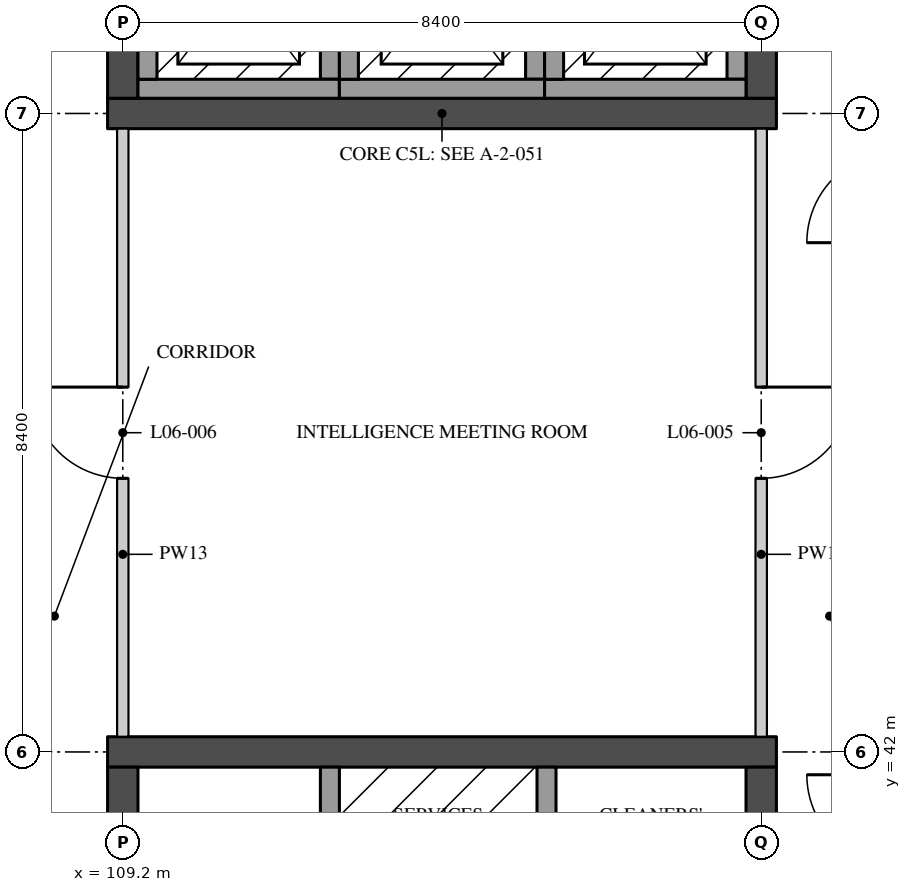
"""IFC4 building model, lengths in metres.
Left out: names, types, materials, properties, quantities, classifications, styles, units other than length and angle.
Written with IfcOpenShell. Run it as: python <this file> out.ifc"""

import sys

from ifc_helpers import new_model, si_unit, direction, frame, frame_2d, origin, place, context, subcontext, project, spatial, rectangle, extrude, element, fill, save


model = new_model("IFC4")
c1 = context("Model", 3, precision=1e-05, world=origin(), true_north=direction((0.0, 1.0)))
c2 = subcontext(c1, "Body", "Model", "MODEL_VIEW")
j1 = project(units=[si_unit("LENGTHUNIT", "METRE"), si_unit("PLANEANGLEUNIT", "RADIAN")], contexts=[c1])
p1 = place(None, origin())
s1 = spatial("IfcSite", under=j1, at=p1, CompositionType="ELEMENT")
p2 = place(p1, origin())
s2 = spatial("IfcBuilding", under=s1, at=p2, CompositionType="ELEMENT")
p3 = place(p2, frame((0.0, 0.0, 27.9)))
s3 = spatial("IfcBuildingStorey", under=s2, at=p3, CompositionType="ELEMENT", Elevation=27.9)
p4 = place(p3, frame((109.0, 50.4, 0.0), z_axis=(0.0, 0.0, 1.0), x_axis=(1.0, 0.0, 0.0)))
e1 = element("IfcWall", 1, at=p4, inside=s3, PredefinedType="SHEAR", context=c2, shape_type="SweptSolid", body=[
    extrude(rectangle(XDim=8.8, YDim=0.4, at=frame_2d((4.4, 0.0))), origin(), (0.0, 0.0, 1.0), 4.37),
])
p5 = place(p3, frame((109.2, 50.6, 0.0), z_axis=(0.0, 0.0, 1.0), x_axis=(0.0, 1.0, 0.0)))
e2 = element("IfcWall", 2, at=p5, inside=s3, PredefinedType="SHEAR", context=c2, shape_type="SweptSolid", body=[
    extrude(rectangle(XDim=8.0, YDim=0.4, at=frame_2d((4.0, 0.0))), origin(), (0.0, 0.0, 1.0), 4.37),
])
p6 = place(p5, frame((3.25, 0.0, 0.0)))
e3 = element("IfcOpeningElement", 3, at=p6, cuts=e2, PredefinedType="OPENING", context=c2, shape_type="SweptSolid", body=[
    extrude(rectangle(XDim=1.2, YDim=2.1, at=frame_2d((0.6, 1.05))), frame((0.0, 0.21, 0.0), z_axis=(0.0, -1.0, 0.0), x_axis=(1.0, 0.0, 0.0)), (0.0, 0.0, 1.0), 0.42),
])
p7 = place(p3, frame((117.6, 50.6, 0.0), z_axis=(0.0, 0.0, 1.0), x_axis=(0.0, 1.0, 0.0)))
e4 = element("IfcWall", 4, at=p7, inside=s3, PredefinedType="SHEAR", context=c2, shape_type="SweptSolid", body=[
    extrude(rectangle(XDim=8.0, YDim=0.4, at=frame_2d((4.0, 0.0))), origin(), (0.0, 0.0, 1.0), 4.37),
])
p8 = place(p7, frame((3.25, 0.0, 0.0)))
e5 = element("IfcOpeningElement", 5, at=p8, cuts=e4, PredefinedType="OPENING", context=c2, shape_type="SweptSolid", body=[
    extrude(rectangle(XDim=1.2, YDim=2.1, at=frame_2d((0.6, 1.05))), frame((0.0, 0.21, 0.0), z_axis=(0.0, -1.0, 0.0), x_axis=(1.0, 0.0, 0.0)), (0.0, 0.0, 1.0), 0.42),
])
p9 = place(p7, frame((6.0, 0.0, 0.0)))
e6 = element("IfcOpeningElement", 6, at=p9, cuts=e4, PredefinedType="OPENING", context=c2, shape_type="SweptSolid", body=[
    extrude(rectangle(XDim=1.2, YDim=2.1, at=frame_2d((0.6, 1.05))), frame((0.0, 0.21, 0.0), z_axis=(0.0, -1.0, 0.0), x_axis=(1.0, 0.0, 0.0)), (0.0, 0.0, 1.0), 0.42),
])
p10 = place(p3, frame((109.0, 42.0, 0.0), z_axis=(0.0, 0.0, 1.0), x_axis=(1.0, 0.0, 0.0)))
e7 = element("IfcWall", 7, at=p10, inside=s3, PredefinedType="SHEAR", context=c2, shape_type="SweptSolid", body=[
    extrude(rectangle(XDim=8.8, YDim=0.4, at=frame_2d((4.4, 0.0))), origin(), (0.0, 0.0, 1.0), 4.37),
])
p11 = place(p3, frame((109.2, 33.8, 0.0), z_axis=(0.0, 0.0, 1.0), x_axis=(0.0, 1.0, 0.0)))
e8 = element("IfcWall", 8, at=p11, inside=s3, PredefinedType="SHEAR", context=c2, shape_type="SweptSolid", body=[
    extrude(rectangle(XDim=8.0, YDim=0.4, at=frame_2d((4.0, 0.0))), origin(), (0.0, 0.0, 1.0), 4.37),
])
p12 = place(p11, frame((3.875, 0.0, 0.0)))
e9 = element("IfcOpeningElement", 9, at=p12, cuts=e8, PredefinedType="OPENING", context=c2, shape_type="SweptSolid", body=[
    extrude(rectangle(XDim=1.2, YDim=2.1, at=frame_2d((0.6, 1.05))), frame((0.0, 0.21, 0.0), z_axis=(0.0, -1.0, 0.0), x_axis=(1.0, 0.0, 0.0)), (0.0, 0.0, 1.0), 0.42),
])
p13 = place(p3, frame((117.6, 33.8, 0.0), z_axis=(0.0, 0.0, 1.0), x_axis=(0.0, 1.0, 0.0)))
e10 = element("IfcWall", 10, at=p13, inside=s3, PredefinedType="SHEAR", context=c2, shape_type="SweptSolid", body=[
    extrude(rectangle(XDim=8.0, YDim=0.4, at=frame_2d((4.0, 0.0))), origin(), (0.0, 0.0, 1.0), 4.37),
])
p14 = place(p13, frame((3.875, 0.0, 0.0)))
e11 = element("IfcOpeningElement", 11, at=p14, cuts=e10, PredefinedType="OPENING", context=c2, shape_type="SweptSolid", body=[
    extrude(rectangle(XDim=1.2, YDim=2.1, at=frame_2d((0.6, 1.05))), frame((0.0, 0.21, 0.0), z_axis=(0.0, -1.0, 0.0), x_axis=(1.0, 0.0, 0.0)), (0.0, 0.0, 1.0), 0.42),
])
p15 = place(p3, frame((111.925, 39.0, 0.0), z_axis=(0.0, 0.0, 1.0), x_axis=(0.0, 1.0, 0.0)))
e12 = element("IfcWall", 12, at=p15, inside=s3, PredefinedType="SOLIDWALL", context=c2, shape_type="SweptSolid", body=[
    extrude(rectangle(XDim=2.8, YDim=0.25, at=frame_2d((1.4, 0.0))), origin(), (0.0, 0.0, 1.0), 4.37),
])
p16 = place(p3, frame((114.775, 39.25, 0.0), z_axis=(0.0, 0.0, 1.0), x_axis=(0.0, 1.0, 0.0)))
e13 = element("IfcWall", 13, at=p16, inside=s3, PredefinedType="SOLIDWALL", context=c2, shape_type="SweptSolid", body=[
    extrude(rectangle(XDim=2.55, YDim=0.25, at=frame_2d((1.275, 0.0))), origin(), (0.0, 0.0, 1.0), 4.37),
])
p17 = place(p3, frame((111.925, 50.85, 0.0), z_axis=(0.0, 0.0, 1.0), x_axis=(0.0, 1.0, 0.0)))
e14 = element("IfcWall", 14, at=p17, inside=s3, PredefinedType="SOLIDWALL", context=c2, shape_type="SweptSolid", body=[
    extrude(rectangle(XDim=2.3, YDim=0.25, at=frame_2d((1.15, 0.0))), origin(), (0.0, 0.0, 1.0), 4.37),
])
p18 = place(p3, frame((109.4, 50.725, 0.0), z_axis=(0.0, 0.0, 1.0), x_axis=(1.0, 0.0, 0.0)))
e15 = element("IfcWall", 15, at=p18, inside=s3, PredefinedType="SOLIDWALL", context=c2, shape_type="SweptSolid", body=[
    extrude(rectangle(XDim=2.65, YDim=0.25, at=frame_2d((1.325, 0.0))), origin(), (0.0, 0.0, 1.0), 4.37),
])
for number, where, z_axis, x_axis in (
    (16, (109.525, 50.85, 0.0), (0.0, 0.0, 1.0), (0.0, 1.0, 0.0)),
    (17, (114.625, 50.85, 0.0), (0.0, 0.0, 1.0), (0.0, 1.0, 0.0)),
):
    element("IfcWall", number, at=place(p3, frame(where, z_axis=z_axis, x_axis=x_axis)), inside=s3, PredefinedType="SOLIDWALL", context=c2, shape_type="SweptSolid", body=[
        extrude(rectangle(XDim=2.3, YDim=0.25, at=frame_2d((1.15, 0.0))), origin(), (0.0, 0.0, 1.0), 4.37),
    ])
p19 = place(p3, frame((112.05, 50.725, 0.0), z_axis=(0.0, 0.0, 1.0), x_axis=(1.0, 0.0, 0.0)))
e18 = element("IfcWall", 18, at=p19, inside=s3, PredefinedType="SOLIDWALL", context=c2, shape_type="SweptSolid", body=[
    extrude(rectangle(XDim=2.7, YDim=0.25, at=frame_2d((1.35, 0.0))), origin(), (0.0, 0.0, 1.0), 4.37),
])
for number, where, z_axis, x_axis in (
    (19, (112.175, 50.85, 0.0), (0.0, 0.0, 1.0), (0.0, 1.0, 0.0)),
    (20, (117.275, 50.85, 0.0), (0.0, 0.0, 1.0), (0.0, 1.0, 0.0)),
):
    element("IfcWall", number, at=place(p3, frame(where, z_axis=z_axis, x_axis=x_axis)), inside=s3, PredefinedType="SOLIDWALL", context=c2, shape_type="SweptSolid", body=[
        extrude(rectangle(XDim=2.3, YDim=0.25, at=frame_2d((1.15, 0.0))), origin(), (0.0, 0.0, 1.0), 4.37),
    ])
p20 = place(p3, frame((114.75, 50.725, 0.0), z_axis=(0.0, 0.0, 1.0), x_axis=(1.0, 0.0, 0.0)))
e21 = element("IfcWall", 21, at=p20, inside=s3, PredefinedType="SOLIDWALL", context=c2, shape_type="SweptSolid", body=[
    extrude(rectangle(XDim=2.65, YDim=0.25, at=frame_2d((1.325, 0.0))), origin(), (0.0, 0.0, 1.0), 4.37),
])
p21 = place(p3, frame((114.875, 50.85, 0.0), z_axis=(0.0, 0.0, 1.0), x_axis=(0.0, 1.0, 0.0)))
e22 = element("IfcWall", 22, at=p21, inside=s3, PredefinedType="SOLIDWALL", context=c2, shape_type="SweptSolid", body=[
    extrude(rectangle(XDim=2.3, YDim=0.25, at=frame_2d((1.15, 0.0))), origin(), (0.0, 0.0, 1.0), 4.37),
])
p22 = place(p3, frame((117.6, 42.2, 0.0), z_axis=(0.0, 0.0, 1.0), x_axis=(0.0, 1.0, 0.0)))
e23 = element("IfcWall", 23, at=p22, inside=s3, PredefinedType="PARTITIONING", context=c2, shape_type="SweptSolid", body=[
    extrude(rectangle(XDim=8.0, YDim=0.15, at=frame_2d((4.0, 0.0))), origin(), (0.0, 0.0, 1.0), 3.746),
])
p23 = place(p22, frame((3.4, 0.0, 0.0)))
e24 = element("IfcOpeningElement", 24, at=p23, cuts=e23, PredefinedType="OPENING", context=c2, shape_type="SweptSolid", body=[
    extrude(rectangle(XDim=1.2, YDim=2.4, at=frame_2d((0.6, 1.2))), frame((0.0, 0.085, 0.0), z_axis=(0.0, -1.0, 0.0), x_axis=(1.0, 0.0, 0.0)), (0.0, 0.0, 1.0), 0.17),
])
p24 = place(p3, frame((109.2, 42.2, 0.0), z_axis=(0.0, 0.0, 1.0), x_axis=(0.0, 1.0, 0.0)))
e25 = element("IfcWall", 25, at=p24, inside=s3, PredefinedType="PARTITIONING", context=c2, shape_type="SweptSolid", body=[
    extrude(rectangle(XDim=8.0, YDim=0.15, at=frame_2d((4.0, 0.0))), origin(), (0.0, 0.0, 1.0), 3.746),
])
p25 = place(p24, frame((3.4, 0.0, 0.0)))
e26 = element("IfcOpeningElement", 26, at=p25, cuts=e25, PredefinedType="OPENING", context=c2, shape_type="SweptSolid", body=[
    extrude(rectangle(XDim=1.2, YDim=2.4, at=frame_2d((0.6, 1.2))), frame((0.0, 0.085, 0.0), z_axis=(0.0, -1.0, 0.0), x_axis=(1.0, 0.0, 0.0)), (0.0, 0.0, 1.0), 0.17),
])
p26 = place(p23, frame((1.2, 0.0, 0.0), z_axis=(0.0, 0.0, 1.0), x_axis=(-1.0, 0.0, 0.0)))
e27 = element("IfcDoor", 27, at=p26, inside=s3, OperationType="SINGLE_SWING_RIGHT", PredefinedType="DOOR", context=c2, shape_type="SweptSolid", body=[
    extrude(rectangle(XDim=1.2, YDim=2.4, at=frame_2d((0.6, 1.2))), frame((0.0, 0.025, 0.0), z_axis=(0.0, -1.0, 0.0), x_axis=(1.0, 0.0, 0.0)), (0.0, 0.0, 1.0), 0.05),
])
fill(e24, e27)
p27 = place(p25, origin())
e28 = element("IfcDoor", 28, at=p27, inside=s3, OperationType="SINGLE_SWING_LEFT", PredefinedType="DOOR", context=c2, shape_type="SweptSolid", body=[
    extrude(rectangle(XDim=1.2, YDim=2.4, at=frame_2d((0.6, 1.2))), frame((0.0, 0.025, 0.0), z_axis=(0.0, -1.0, 0.0), x_axis=(1.0, 0.0, 0.0)), (0.0, 0.0, 1.0), 0.05),
])
fill(e26, e28)
save(model, sys.argv[1])
